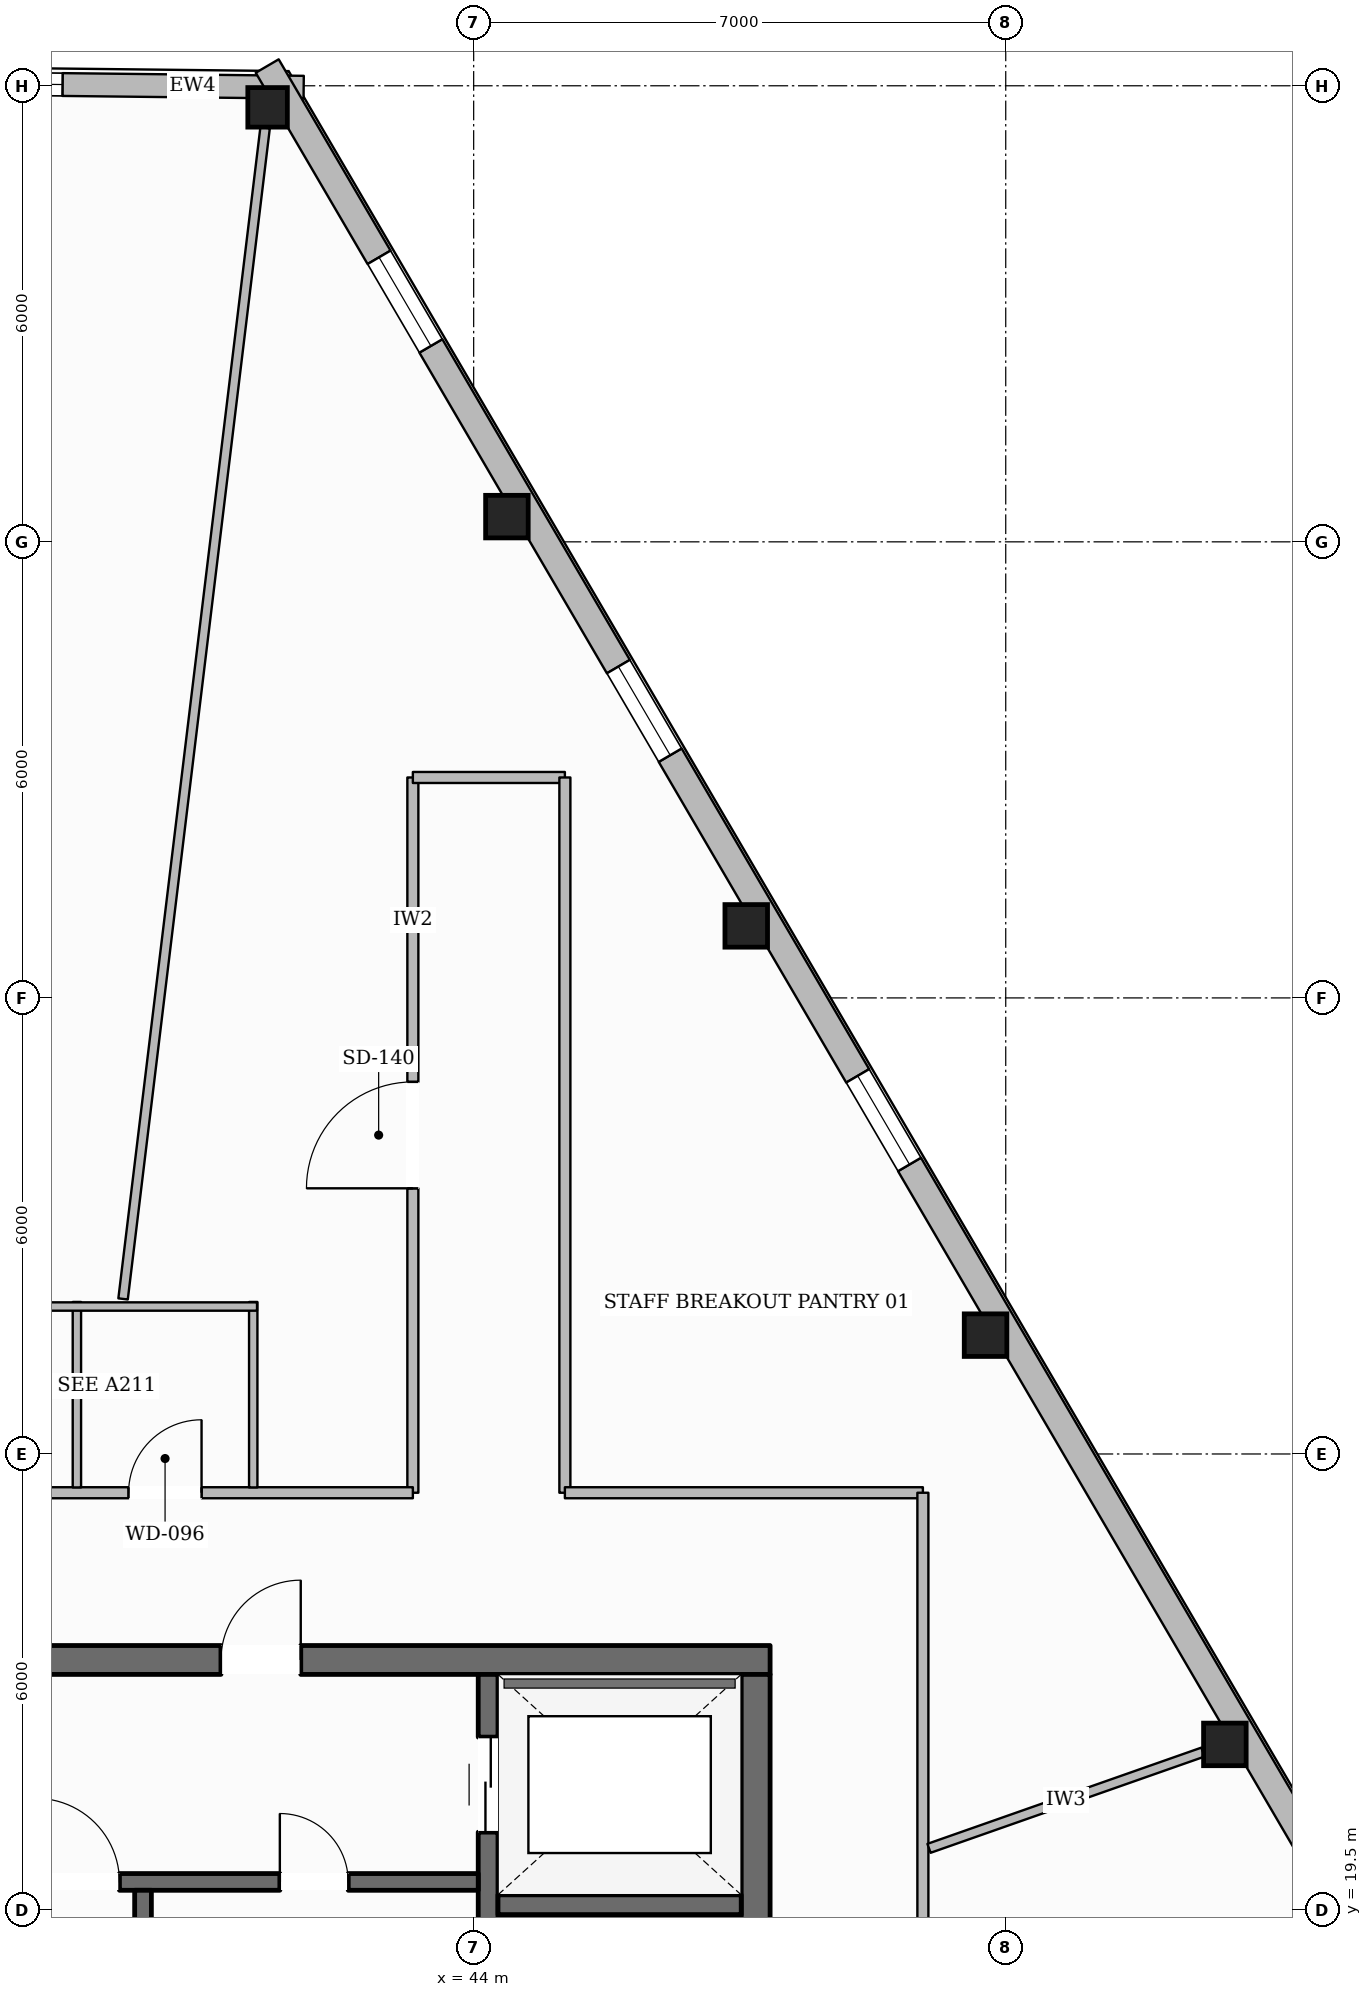
"""IFC4 building model, lengths in metres.
Left out: names, types, materials, properties, quantities, classifications, styles, units other than length and angle.
Written with IfcOpenShell. Run it as: python <this file> out.ifc"""

import sys

from ifc_helpers import new_model, si_unit, direction, frame, frame_2d, origin, origin_2d, place, context, subcontext, project, spatial, rectangle, hollow_rectangle, extrude, element, fill, save


model = new_model("IFC4")
c1 = context("Model", 3, precision=1e-05, world=origin(), true_north=direction((0.0, 1.0)))
c2 = subcontext(c1, "Body", "Model", "MODEL_VIEW")
j1 = project(units=[si_unit("LENGTHUNIT", "METRE"), si_unit("PLANEANGLEUNIT", "RADIAN")], contexts=[c1])
p1 = place(None, origin())
s1 = spatial("IfcSite", under=j1, at=p1, CompositionType="ELEMENT")
p2 = place(p1, origin())
s2 = spatial("IfcBuilding", under=s1, at=p2, CompositionType="ELEMENT")
p3 = place(p2, frame((0.0, 0.0, 251.05)))
s3 = spatial("IfcBuildingStorey", under=s2, at=p3, CompositionType="ELEMENT", Elevation=251.05)
p4 = place(p3, frame((28.1, 22.79, 0.0), z_axis=(0.0, 0.0, 1.0), x_axis=(1.0, 0.0, 0.0)))
e1 = element("IfcWall", 1, at=p4, inside=s3, PredefinedType="SOLIDWALL", context=c2, shape_type="SweptSolid", body=[
    extrude(rectangle(XDim=19.8, YDim=0.38, at=frame_2d((9.9, 0.0))), origin(), (0.0, 0.0, 1.0), 3.61),
])
p5 = place(p4, frame((6.175, 0.0, 0.0)))
e2 = element("IfcOpeningElement", 2, at=p5, cuts=e1, PredefinedType="OPENING", context=c2, shape_type="SweptSolid", body=[
    extrude(rectangle(XDim=1.05, YDim=2.15, at=frame_2d((0.525, 1.075))), frame((0.0, 0.2, 0.0), z_axis=(0.0, -1.0, 0.0), x_axis=(1.0, 0.0, 0.0)), (0.0, 0.0, 1.0), 0.4),
])
p6 = place(p4, frame((12.575, 0.0, 0.0)))
e3 = element("IfcOpeningElement", 3, at=p6, cuts=e1, PredefinedType="OPENING", context=c2, shape_type="SweptSolid", body=[
    extrude(rectangle(XDim=1.05, YDim=2.15, at=frame_2d((0.525, 1.075))), frame((0.0, 0.2, 0.0), z_axis=(0.0, -1.0, 0.0), x_axis=(1.0, 0.0, 0.0)), (0.0, 0.0, 1.0), 0.4),
])
p7 = place(p3, frame((47.71, 9.6, 0.0), z_axis=(0.0, 0.0, 1.0), x_axis=(0.0, 1.0, 0.0)))
e4 = element("IfcWall", 4, at=p7, inside=s3, PredefinedType="SOLIDWALL", context=c2, shape_type="SweptSolid", body=[
    extrude(rectangle(XDim=13.0, YDim=0.38, at=frame_2d((6.5, 0.0))), origin(), (0.0, 0.0, 1.0), 3.61),
])
p8 = place(p7, frame((0.2, 0.0, 0.0)))
e5 = element("IfcOpeningElement", 5, at=p8, cuts=e4, PredefinedType="OPENING", context=c2, shape_type="SweptSolid", body=[
    extrude(rectangle(XDim=1.1, YDim=2.15, at=frame_2d((0.55, 1.075))), frame((0.0, 0.2, 0.0), z_axis=(0.0, -1.0, 0.0), x_axis=(1.0, 0.0, 0.0)), (0.0, 0.0, 1.0), 0.4),
])
p9 = place(p7, frame((8.4, 0.0, 0.0)))
e6 = element("IfcOpeningElement", 6, at=p9, cuts=e4, PredefinedType="OPENING", context=c2, shape_type="SweptSolid", body=[
    extrude(rectangle(XDim=0.9, YDim=2.1, at=frame_2d((0.45, 1.05))), frame((0.0, 0.2, 0.0), z_axis=(0.0, -1.0, 0.0), x_axis=(1.0, 0.0, 0.0)), (0.0, 0.0, 1.0), 0.4),
])
p10 = place(p3, frame((44.19, 9.6, 0.0), z_axis=(0.0, 0.0, 1.0), x_axis=(0.0, 1.0, 0.0)))
e7 = element("IfcWall", 7, at=p10, inside=s3, PredefinedType="SHEAR", context=c2, shape_type="SweptSolid", body=[
    extrude(rectangle(XDim=13.0, YDim=0.26, at=frame_2d((6.5, 0.0))), origin(), (0.0, 0.0, 1.0), 3.61),
])
p11 = place(p10, frame((10.925, 0.0, 0.0)))
e8 = element("IfcOpeningElement", 8, at=p11, cuts=e7, PredefinedType="OPENING", context=c2, shape_type="SweptSolid", body=[
    extrude(rectangle(XDim=1.25, YDim=2.25, at=frame_2d((0.625, 1.125))), frame((0.0, 0.14, 0.0), z_axis=(0.0, -1.0, 0.0), x_axis=(1.0, 0.0, 0.0)), (0.0, 0.0, 1.0), 0.28),
])
p12 = place(p3, frame((44.32, 19.57, 0.0), z_axis=(0.0, 0.0, 1.0), x_axis=(1.0, 0.0, 0.0)))
e9 = element("IfcWall", 9, at=p12, inside=s3, PredefinedType="SHEAR", context=c2, shape_type="SweptSolid", body=[
    extrude(rectangle(XDim=3.2, YDim=0.26, at=frame_2d((1.6, 0.0))), origin(), (0.0, 0.0, 1.0), 3.61),
])
p13 = place(p3, frame((31.94, 19.87, 0.0), z_axis=(0.0, 0.0, 1.0), x_axis=(1.0, 0.0, 0.0)))
e10 = element("IfcWall", 10, at=p13, inside=s3, PredefinedType="SOLIDWALL", context=c2, shape_type="SweptSolid", body=[
    extrude(rectangle(XDim=12.12, YDim=0.22, at=frame_2d((6.06, 0.0))), origin(), (0.0, 0.0, 1.0), 3.61),
])
p14 = place(p13, frame((6.3, 0.0, 0.0)))
e11 = element("IfcOpeningElement", 11, at=p14, cuts=e10, PredefinedType="OPENING", context=c2, shape_type="SweptSolid", body=[
    extrude(rectangle(XDim=1.1, YDim=2.15, at=frame_2d((0.55, 1.075))), frame((0.0, 0.12, 0.0), z_axis=(0.0, -1.0, 0.0), x_axis=(1.0, 0.0, 0.0)), (0.0, 0.0, 1.0), 0.24),
])
p15 = place(p13, frame((9.51, 0.0, 0.0)))
e12 = element("IfcOpeningElement", 12, at=p15, cuts=e10, PredefinedType="OPENING", context=c2, shape_type="SweptSolid", body=[
    extrude(rectangle(XDim=0.9, YDim=2.1, at=frame_2d((0.45, 1.05))), frame((0.0, 0.12, 0.0), z_axis=(0.0, -1.0, 0.0), x_axis=(1.0, 0.0, 0.0)), (0.0, 0.0, 1.0), 0.24),
])
p16 = place(p3, frame((39.65, 16.56, 0.0), z_axis=(0.0, 0.0, 1.0), x_axis=(0.0, 1.0, 0.0)))
e13 = element("IfcWall", 13, at=p16, inside=s3, PredefinedType="SOLIDWALL", context=c2, shape_type="SweptSolid", body=[
    extrude(rectangle(XDim=3.2, YDim=0.22, at=frame_2d((1.6, 0.0))), origin(), (0.0, 0.0, 1.0), 3.61),
])
for number, where, z_axis, x_axis in (
    (14, (53.883, 21.679, 0.0), (0.0, 0.0, 1.0), (1.0, 0.0, 0.0)),
    (15, (50.734, 27.063, 0.0), (0.0, 0.0, 1.0), (1.0, 0.0, 0.0)),
    (16, (47.586, 32.448, 0.0), (0.0, 0.0, 1.0), (1.0, 0.0, 0.0)),
    (17, (44.437, 37.832, 0.0), (0.0, 0.0, 1.0), (1.0, 0.0, 0.0)),
):
    element("IfcColumn", number, at=place(p3, frame(where, z_axis=z_axis, x_axis=x_axis)), inside=s3, PredefinedType="COLUMN", context=c2, shape_type="SweptSolid", body=[
        extrude(hollow_rectangle(XDim=0.56, YDim=0.56, WallThickness=0.025, at=origin_2d()), origin(), (0.0, 0.0, 1.0), 3.61),
    ])
p17 = place(p3, frame((41.289, 43.216, 0.0), z_axis=(0.0, 0.0, 1.0), x_axis=(1.0, 0.0, 0.0)))
e18 = element("IfcColumn", 18, at=p17, inside=s3, PredefinedType="COLUMN", context=c2, shape_type="SweptSolid", body=[
    extrude(hollow_rectangle(XDim=0.52, YDim=0.52, WallThickness=0.024, at=origin_2d()), origin(), (0.0, 0.0, 1.0), 3.61),
])
p18 = place(p3, frame((34.367, 43.564, 0.0), z_axis=(0.0, 0.0, 1.0), x_axis=(0.999937028375, -0.011222267359, 0.0)))
e19 = element("IfcWall", 19, at=p18, inside=s3, PredefinedType="STANDARD", context=c2, shape_type="SweptSolid", body=[
    extrude(rectangle(XDim=7.397, YDim=0.3, at=frame_2d((3.698, 0.0))), origin(), (0.0, 0.0, 1.0), 3.196),
])
p19 = place(p18, frame((3.173, 0.0, 0.65)))
e20 = element("IfcOpeningElement", 20, at=p19, cuts=e19, PredefinedType="OPENING", context=c2, shape_type="SweptSolid", body=[
    extrude(rectangle(XDim=1.05, YDim=1.7, at=frame_2d((0.525, 0.85))), frame((0.0, 0.16, 0.0), z_axis=(0.0, -1.0, 0.0), x_axis=(1.0, 0.0, 0.0)), (0.0, 0.0, 1.0), 0.32),
])
p20 = place(p3, frame((41.284, 43.76, 0.0), z_axis=(0.0, 0.0, 1.0), x_axis=(0.50479404613, -0.863239810824, 0.0)))
e21 = element("IfcWall", 21, at=p20, inside=s3, PredefinedType="STANDARD", context=c2, shape_type="SweptSolid", body=[
    extrude(rectangle(XDim=38.372, YDim=0.35, at=frame_2d((19.186, 0.0))), origin(), (0.0, 0.0, 1.0), 3.196),
])
p21 = place(p20, frame((34.102, 0.0, 0.65)))
e22 = element("IfcOpeningElement", 22, at=p21, cuts=e21, PredefinedType="OPENING", context=c2, shape_type="SweptSolid", body=[
    extrude(rectangle(XDim=1.35, YDim=1.75, at=frame_2d((0.675, 0.875))), frame((0.0, 0.185, 0.0), z_axis=(0.0, -1.0, 0.0), x_axis=(1.0, 0.0, 0.0)), (0.0, 0.0, 1.0), 0.37),
])
p22 = place(p20, frame((27.864, 0.0, 0.65)))
e23 = element("IfcOpeningElement", 23, at=p22, cuts=e21, PredefinedType="OPENING", context=c2, shape_type="SweptSolid", body=[
    extrude(rectangle(XDim=1.35, YDim=1.75, at=frame_2d((0.675, 0.875))), frame((0.0, 0.185, 0.0), z_axis=(0.0, -1.0, 0.0), x_axis=(1.0, 0.0, 0.0)), (0.0, 0.0, 1.0), 0.37),
])
p23 = place(p20, frame((15.39, 0.0, 0.65)))
e24 = element("IfcOpeningElement", 24, at=p23, cuts=e21, PredefinedType="OPENING", context=c2, shape_type="SweptSolid", body=[
    extrude(rectangle(XDim=1.35, YDim=1.75, at=frame_2d((0.675, 0.875))), frame((0.0, 0.185, 0.0), z_axis=(0.0, -1.0, 0.0), x_axis=(1.0, 0.0, 0.0)), (0.0, 0.0, 1.0), 0.37),
])
p24 = place(p20, frame((9.153, 0.0, 0.65)))
e25 = element("IfcOpeningElement", 25, at=p24, cuts=e21, PredefinedType="OPENING", context=c2, shape_type="SweptSolid", body=[
    extrude(rectangle(XDim=1.35, YDim=1.75, at=frame_2d((0.675, 0.875))), frame((0.0, 0.185, 0.0), z_axis=(0.0, -1.0, 0.0), x_axis=(1.0, 0.0, 0.0)), (0.0, 0.0, 1.0), 0.37),
])
p25 = place(p20, frame((2.915, 0.0, 0.65)))
e26 = element("IfcOpeningElement", 26, at=p25, cuts=e21, PredefinedType="OPENING", context=c2, shape_type="SweptSolid", body=[
    extrude(rectangle(XDim=1.35, YDim=1.75, at=frame_2d((0.675, 0.875))), frame((0.0, 0.185, 0.0), z_axis=(0.0, -1.0, 0.0), x_axis=(1.0, 0.0, 0.0)), (0.0, 0.0, 1.0), 0.37),
])
p26 = place(p3, frame((43.2, 24.99, 0.0), z_axis=(0.0, 0.0, 1.0), x_axis=(0.0, 1.0, 0.0)))
e27 = element("IfcWall", 27, at=p26, inside=s3, PredefinedType="PARTITIONING", context=c2, shape_type="SweptSolid", body=[
    extrude(rectangle(XDim=9.41, YDim=0.145, at=frame_2d((4.705, 0.0))), origin(), (0.0, 0.0, 1.0), 3.61),
])
p27 = place(p26, frame((4.005, 0.0, 0.0)))
e28 = element("IfcOpeningElement", 28, at=p27, cuts=e27, PredefinedType="OPENING", context=c2, shape_type="SweptSolid", body=[
    extrude(rectangle(XDim=1.4, YDim=2.2, at=frame_2d((0.7, 1.1))), frame((0.0, 0.083, 0.0), z_axis=(0.0, -1.0, 0.0), x_axis=(1.0, 0.0, 0.0)), (0.0, 0.0, 1.0), 0.165),
])
p28 = place(p3, frame((43.2, 34.4, 0.0), z_axis=(0.0, 0.0, 1.0), x_axis=(1.0, 0.0, 0.0)))
e29 = element("IfcWall", 29, at=p28, inside=s3, PredefinedType="PARTITIONING", context=c2, shape_type="SweptSolid", body=[
    extrude(rectangle(XDim=2.0, YDim=0.145, at=frame_2d((1.0, 0.0))), origin(), (0.0, 0.0, 1.0), 3.61),
])
p29 = place(p3, frame((45.2, 34.4, 0.0), z_axis=(0.0, 0.0, 1.0), x_axis=(0.0, -1.0, 0.0)))
e30 = element("IfcWall", 30, at=p29, inside=s3, PredefinedType="PARTITIONING", context=c2, shape_type="SweptSolid", body=[
    extrude(rectangle(XDim=9.41, YDim=0.145, at=frame_2d((4.705, 0.0))), origin(), (0.0, 0.0, 1.0), 3.61),
])
p30 = place(p3, frame((45.2, 24.99, 0.0), z_axis=(0.0, 0.0, 1.0), x_axis=(1.0, 0.0, 0.0)))
e31 = element("IfcWall", 31, at=p30, inside=s3, PredefinedType="PARTITIONING", context=c2, shape_type="SweptSolid", body=[
    extrude(rectangle(XDim=4.71, YDim=0.145, at=frame_2d((2.355, 0.0))), origin(), (0.0, 0.0, 1.0), 3.61),
])
p31 = place(p3, frame((49.91, 24.99, 0.0), z_axis=(0.0, 0.0, 1.0), x_axis=(0.0, -1.0, 0.0)))
e32 = element("IfcWall", 32, at=p31, inside=s3, PredefinedType="PARTITIONING", context=c2, shape_type="SweptSolid", body=[
    extrude(rectangle(XDim=7.34, YDim=0.145, at=frame_2d((3.67, 0.0))), origin(), (0.0, 0.0, 1.0), 3.349),
])
p32 = place(p3, frame((26.09, 24.99, 0.0), z_axis=(0.0, 0.0, 1.0), x_axis=(1.0, 0.0, 0.0)))
e33 = element("IfcWall", 33, at=p32, inside=s3, PredefinedType="PARTITIONING", context=c2, shape_type="SweptSolid", body=[
    extrude(rectangle(XDim=17.11, YDim=0.145, at=frame_2d((8.555, 0.0))), origin(), (0.0, 0.0, 1.0), 3.61),
])
p33 = place(p32, frame((8.47, 0.0, 0.0)))
e34 = element("IfcOpeningElement", 34, at=p33, cuts=e33, PredefinedType="OPENING", context=c2, shape_type="SweptSolid", body=[
    extrude(rectangle(XDim=0.88, YDim=2.1, at=frame_2d((0.44, 1.05))), frame((0.0, 0.083, 0.0), z_axis=(0.0, -1.0, 0.0), x_axis=(1.0, 0.0, 0.0)), (0.0, 0.0, 1.0), 0.165),
])
p34 = place(p32, frame((10.99, 0.0, 0.0)))
e35 = element("IfcOpeningElement", 35, at=p34, cuts=e33, PredefinedType="OPENING", context=c2, shape_type="SweptSolid", body=[
    extrude(rectangle(XDim=0.88, YDim=2.1, at=frame_2d((0.44, 1.05))), frame((0.0, 0.083, 0.0), z_axis=(0.0, -1.0, 0.0), x_axis=(1.0, 0.0, 0.0)), (0.0, 0.0, 1.0), 0.165),
])
p35 = place(p32, frame((13.37, 0.0, 0.0)))
e36 = element("IfcOpeningElement", 36, at=p35, cuts=e33, PredefinedType="OPENING", context=c2, shape_type="SweptSolid", body=[
    extrude(rectangle(XDim=0.96, YDim=2.1, at=frame_2d((0.48, 1.05))), frame((0.0, 0.083, 0.0), z_axis=(0.0, -1.0, 0.0), x_axis=(1.0, 0.0, 0.0)), (0.0, 0.0, 1.0), 0.165),
])
p36 = place(p32, frame((4.257, 0.0, 0.0)))
e37 = element("IfcOpeningElement", 37, at=p36, cuts=e33, PredefinedType="OPENING", context=c2, shape_type="SweptSolid", body=[
    extrude(rectangle(XDim=1.4, YDim=2.2, at=frame_2d((0.7, 1.1))), frame((0.0, 0.083, 0.0), z_axis=(0.0, -1.0, 0.0), x_axis=(1.0, 0.0, 0.0)), (0.0, 0.0, 1.0), 0.165),
])
for number, where, z_axis, x_axis in (
    (38, (38.78, 25.06, 0.0), (0.0, 0.0, 1.0), (0.0, 1.0, 0.0)),
    (39, (41.1, 25.06, 0.0), (0.0, 0.0, 1.0), (0.0, 1.0, 0.0)),
):
    element("IfcWall", number, at=place(p3, frame(where, z_axis=z_axis, x_axis=x_axis)), inside=s3, PredefinedType="PLUMBINGWALL", context=c2, shape_type="SweptSolid", body=[
        extrude(rectangle(XDim=2.44, YDim=0.11, at=frame_2d((1.22, 0.0))), origin(), (0.0, 0.0, 1.0), 3.61),
    ])
p37 = place(p3, frame((33.69, 27.44, 0.0), z_axis=(0.0, 0.0, 1.0), x_axis=(1.0, 0.0, 0.0)))
e40 = element("IfcWall", 40, at=p37, inside=s3, PredefinedType="PLUMBINGWALL", context=c2, shape_type="SweptSolid", body=[
    extrude(rectangle(XDim=7.46, YDim=0.11, at=frame_2d((3.73, 0.0))), origin(), (0.0, 0.0, 1.0), 3.61),
])
p38 = place(p3, frame((49.99, 20.312, 0.0), z_axis=(0.0, 0.0, 1.0), x_axis=(0.943507124712, 0.331352237986, 0.0)))
e41 = element("IfcWall", 41, at=p38, inside=s3, PredefinedType="PARTITIONING", context=c2, shape_type="SweptSolid", body=[
    extrude(rectangle(XDim=3.82, YDim=0.125, at=frame_2d((1.91, 0.0))), origin(), (0.0, 0.0, 1.0), 3.61),
])
p39 = place(p3, frame((39.387, 27.54, 0.0), z_axis=(0.0, 0.0, 1.0), x_axis=(0.12041169592, 0.99272404196, 0.0)))
e42 = element("IfcWall", 42, at=p39, inside=s3, PredefinedType="PARTITIONING", context=c2, shape_type="SweptSolid", body=[
    extrude(rectangle(XDim=15.521, YDim=0.125, at=frame_2d((7.76, 0.0))), origin(), (0.0, 0.0, 1.0), 3.246),
])
p40 = place(p23, origin())
e43 = element("IfcWindow", 43, at=p40, inside=s3, PartitioningType="SINGLE_PANEL", PredefinedType="WINDOW", context=c2, shape_type="SweptSolid", body=[
    extrude(rectangle(XDim=1.35, YDim=1.75, at=frame_2d((0.675, 0.875))), frame((0.0, 0.03, 0.0), z_axis=(0.0, -1.0, 0.0), x_axis=(1.0, 0.0, 0.0)), (0.0, 0.0, 1.0), 0.06),
])
fill(e24, e43)
p41 = place(p24, origin())
e44 = element("IfcWindow", 44, at=p41, inside=s3, PartitioningType="SINGLE_PANEL", PredefinedType="WINDOW", context=c2, shape_type="SweptSolid", body=[
    extrude(rectangle(XDim=1.35, YDim=1.75, at=frame_2d((0.675, 0.875))), frame((0.0, 0.03, 0.0), z_axis=(0.0, -1.0, 0.0), x_axis=(1.0, 0.0, 0.0)), (0.0, 0.0, 1.0), 0.06),
])
fill(e25, e44)
p42 = place(p25, origin())
e45 = element("IfcWindow", 45, at=p42, inside=s3, PartitioningType="SINGLE_PANEL", PredefinedType="WINDOW", context=c2, shape_type="SweptSolid", body=[
    extrude(rectangle(XDim=1.35, YDim=1.75, at=frame_2d((0.675, 0.875))), frame((0.0, 0.03, 0.0), z_axis=(0.0, -1.0, 0.0), x_axis=(1.0, 0.0, 0.0)), (0.0, 0.0, 1.0), 0.06),
])
fill(e26, e45)
p43 = place(p19, origin())
e46 = element("IfcWindow", 46, at=p43, inside=s3, PartitioningType="SINGLE_PANEL", PredefinedType="WINDOW", context=c2, shape_type="SweptSolid", body=[
    extrude(rectangle(XDim=1.05, YDim=1.7, at=frame_2d((0.525, 0.85))), frame((0.0, 0.03, 0.0), z_axis=(0.0, -1.0, 0.0), x_axis=(1.0, 0.0, 0.0)), (0.0, 0.0, 1.0), 0.06),
])
fill(e20, e46)
p44 = place(p14, origin())
e47 = element("IfcDoor", 47, at=p44, inside=s3, OperationType="SINGLE_SWING_LEFT", PredefinedType="DOOR", context=c2, shape_type="SweptSolid", body=[
    extrude(rectangle(XDim=1.1, YDim=2.15, at=frame_2d((0.55, 1.075))), frame((0.0, 0.025, 0.0), z_axis=(0.0, -1.0, 0.0), x_axis=(1.0, 0.0, 0.0)), (0.0, 0.0, 1.0), 0.05),
])
fill(e11, e47)
p45 = place(p6, origin())
e48 = element("IfcDoor", 48, at=p45, inside=s3, OperationType="SINGLE_SWING_RIGHT", PredefinedType="DOOR", context=c2, shape_type="SweptSolid", body=[
    extrude(rectangle(XDim=1.05, YDim=2.15, at=frame_2d((0.525, 1.075))), frame((0.0, 0.025, 0.0), z_axis=(0.0, -1.0, 0.0), x_axis=(1.0, 0.0, 0.0)), (0.0, 0.0, 1.0), 0.05),
])
fill(e3, e48)
p46 = place(p11, origin())
e49 = element("IfcDoor", 49, at=p46, inside=s3, OperationType="DOUBLE_DOOR_SLIDING", PredefinedType="DOOR", context=c2, shape_type="SweptSolid", body=[
    extrude(rectangle(XDim=1.25, YDim=2.25, at=frame_2d((0.625, 1.125))), frame((0.0, 0.025, 0.0), z_axis=(0.0, -1.0, 0.0), x_axis=(1.0, 0.0, 0.0)), (0.0, 0.0, 1.0), 0.05),
])
fill(e8, e49)
p47 = place(p15, origin())
e50 = element("IfcDoor", 50, at=p47, inside=s3, OperationType="SINGLE_SWING_LEFT", PredefinedType="DOOR", context=c2, shape_type="SweptSolid", body=[
    extrude(rectangle(XDim=0.9, YDim=2.1, at=frame_2d((0.45, 1.05))), frame((0.0, 0.025, 0.0), z_axis=(0.0, -1.0, 0.0), x_axis=(1.0, 0.0, 0.0)), (0.0, 0.0, 1.0), 0.05),
])
fill(e12, e50)
p48 = place(p35, origin())
e51 = element("IfcDoor", 51, at=p48, inside=s3, OperationType="SINGLE_SWING_RIGHT", PredefinedType="DOOR", context=c2, shape_type="SweptSolid", body=[
    extrude(rectangle(XDim=0.96, YDim=2.1, at=frame_2d((0.48, 1.05))), frame((0.0, 0.025, 0.0), z_axis=(0.0, -1.0, 0.0), x_axis=(1.0, 0.0, 0.0)), (0.0, 0.0, 1.0), 0.05),
])
fill(e36, e51)
p49 = place(p27, origin())
e52 = element("IfcDoor", 52, at=p49, inside=s3, OperationType="SINGLE_SWING_LEFT", PredefinedType="DOOR", context=c2, shape_type="SweptSolid", body=[
    extrude(rectangle(XDim=1.4, YDim=2.2, at=frame_2d((0.7, 1.1))), frame((0.0, 0.025, 0.0), z_axis=(0.0, -1.0, 0.0), x_axis=(1.0, 0.0, 0.0)), (0.0, 0.0, 1.0), 0.05),
])
fill(e28, e52)
save(model, sys.argv[1])
